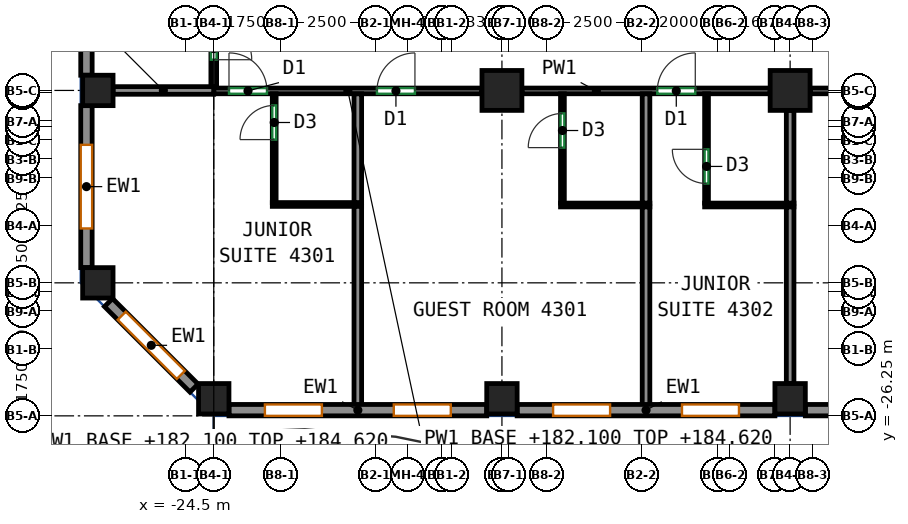
"""IFC4 building model, lengths in metres.
Left out: names, types, materials, properties, quantities, classifications, styles, units other than length and angle.
Written with IfcOpenShell. Run it as: python <this file> out.ifc"""

import sys

from ifc_helpers import new_model, si_unit, direction, frame, frame_2d, origin, origin_2d, place, context, subcontext, project, spatial, rectangle, extrude, source, transform, mapped, element, fill, save


model = new_model("IFC4")
c1 = context("Model", 3, precision=1e-05, world=origin(), true_north=direction((0.0, 1.0)))
c2 = subcontext(c1, "Body", "Model", "MODEL_VIEW")
j1 = project(units=[si_unit("LENGTHUNIT", "METRE"), si_unit("PLANEANGLEUNIT", "RADIAN")], contexts=[c1])
p1 = place(None, origin())
s1 = spatial("IfcSite", under=j1, at=p1, CompositionType="ELEMENT")
p2 = place(p1, origin())
s2 = spatial("IfcBuilding", under=s1, at=p2, CompositionType="ELEMENT")
p3 = place(p2, frame((0.0, 0.0, 182.1)))
s3 = spatial("IfcBuildingStorey", under=s2, at=p3, CompositionType="ELEMENT", Elevation=182.1)
m1 = source(origin(), c2, "Body", "SweptSolid", [
    extrude(rectangle(XDim=0.8, YDim=0.8, at=origin_2d()), origin(), (0.0, 0.0, 1.0), 3.12),
])
for number, where, z_axis, x_axis in (
    (1, (-26.8, -22.75, 0.0), (0.0, 0.0, 1.0), (1.0, 0.0, 0.0)),
    (2, (-26.8, -17.688, 0.0), (0.0, 0.0, 1.0), (1.0, 0.0, 0.0)),
    (3, (-23.75, -25.8, 0.0), (0.0, 0.0, 1.0), (1.0, 0.0, 0.0)),
    (4, (-16.167, -25.8, 0.0), (0.0, 0.0, 1.0), (1.0, 0.0, 0.0)),
):
    element("IfcColumn", number, at=place(p3, frame(where, z_axis=z_axis, x_axis=x_axis)), inside=s3, PredefinedType="COLUMN", context=c2, shape_type="MappedRepresentation", body=[
        mapped(m1, transform((0.0, 0.0, 0.0))),
    ])
m2 = source(origin(), c2, "Body", "SweptSolid", [
    extrude(rectangle(XDim=1.05, YDim=1.05, at=origin_2d()), origin(), (0.0, 0.0, 1.0), 3.12),
])
p4 = place(p3, frame((-16.167, -17.688, 0.0), z_axis=(0.0, 0.0, 1.0), x_axis=(1.0, 0.0, 0.0)))
e5 = element("IfcColumn", 5, at=p4, inside=s3, PredefinedType="COLUMN", context=c2, shape_type="MappedRepresentation", body=[
    mapped(m2, transform((0.0, 0.0, 0.0))),
])
p5 = place(p3, frame((-8.583, -25.8, 0.0), z_axis=(0.0, 0.0, 1.0), x_axis=(1.0, 0.0, 0.0)))
e6 = element("IfcColumn", 6, at=p5, inside=s3, PredefinedType="COLUMN", context=c2, shape_type="MappedRepresentation", body=[
    mapped(m1, transform((0.0, 0.0, 0.0))),
])
p6 = place(p3, frame((-8.583, -17.688, 0.0), z_axis=(0.0, 0.0, 1.0), x_axis=(1.0, 0.0, 0.0)))
e7 = element("IfcColumn", 7, at=p6, inside=s3, PredefinedType="COLUMN", context=c2, shape_type="MappedRepresentation", body=[
    mapped(m2, transform((0.0, 0.0, 0.0))),
])
m3 = source(origin(), c2, "Body", "SweptSolid", [
    extrude(rectangle(XDim=6.783, YDim=0.3, at=frame_2d((3.392, 0.0))), origin(), (0.0, 0.0, 1.0), 3.12),
])
p7 = place(p3, frame((-23.35, -26.1, 0.0), z_axis=(0.0, 0.0, 1.0), x_axis=(1.0, 0.0, 0.0)))
e8 = element("IfcWall", 8, at=p7, inside=s3, PredefinedType="SOLIDWALL", context=c2, shape_type="MappedRepresentation", body=[
    mapped(m3, transform((0.0, 0.0, 0.0))),
])
p8 = place(p7, frame((0.946, 0.0, 0.85)))
e9 = element("IfcOpeningElement", 9, at=p8, cuts=e8, PredefinedType="OPENING", context=c2, shape_type="SweptSolid", body=[
    extrude(rectangle(XDim=1.5, YDim=1.95, at=frame_2d((0.75, 0.975))), frame((0.0, 0.16, 0.0), z_axis=(0.0, -1.0, 0.0), x_axis=(1.0, 0.0, 0.0)), (0.0, 0.0, 1.0), 0.32),
])
p9 = place(p7, frame((4.337, 0.0, 0.85)))
e10 = element("IfcOpeningElement", 10, at=p9, cuts=e8, PredefinedType="OPENING", context=c2, shape_type="SweptSolid", body=[
    extrude(rectangle(XDim=1.5, YDim=1.95, at=frame_2d((0.75, 0.975))), frame((0.0, 0.16, 0.0), z_axis=(0.0, -1.0, 0.0), x_axis=(1.0, 0.0, 0.0)), (0.0, 0.0, 1.0), 0.32),
])
m4 = source(origin(), c2, "Body", "SweptSolid", [
    extrude(rectangle(XDim=6.783, YDim=0.3, at=frame_2d((3.392, 0.0))), origin(), (0.0, 0.0, 1.0), 3.12),
])
p10 = place(p3, frame((-15.767, -26.1, 0.0), z_axis=(0.0, 0.0, 1.0), x_axis=(1.0, 0.0, 0.0)))
e11 = element("IfcWall", 11, at=p10, inside=s3, PredefinedType="SOLIDWALL", context=c2, shape_type="MappedRepresentation", body=[
    mapped(m4, transform((0.0, 0.0, 0.0))),
])
p11 = place(p10, frame((0.946, 0.0, 0.85)))
e12 = element("IfcOpeningElement", 12, at=p11, cuts=e11, PredefinedType="OPENING", context=c2, shape_type="SweptSolid", body=[
    extrude(rectangle(XDim=1.5, YDim=1.95, at=frame_2d((0.75, 0.975))), frame((0.0, 0.16, 0.0), z_axis=(0.0, -1.0, 0.0), x_axis=(1.0, 0.0, 0.0)), (0.0, 0.0, 1.0), 0.32),
])
p12 = place(p10, frame((4.338, 0.0, 0.85)))
e13 = element("IfcOpeningElement", 13, at=p12, cuts=e11, PredefinedType="OPENING", context=c2, shape_type="SweptSolid", body=[
    extrude(rectangle(XDim=1.5, YDim=1.95, at=frame_2d((0.75, 0.975))), frame((0.0, 0.16, 0.0), z_axis=(0.0, -1.0, 0.0), x_axis=(1.0, 0.0, 0.0)), (0.0, 0.0, 1.0), 0.32),
])
p13 = place(p3, frame((-8.183, -26.1, 0.0), z_axis=(0.0, 0.0, 1.0), x_axis=(1.0, 0.0, 0.0)))
e14 = element("IfcWall", 14, at=p13, inside=s3, PredefinedType="SOLIDWALL", context=c2, shape_type="MappedRepresentation", body=[
    mapped(m3, transform((0.0, 0.0, 0.0))),
])
p14 = place(p13, frame((0.946, 0.0, 0.85)))
e15 = element("IfcOpeningElement", 15, at=p14, cuts=e14, PredefinedType="OPENING", context=c2, shape_type="SweptSolid", body=[
    extrude(rectangle(XDim=1.5, YDim=1.95, at=frame_2d((0.75, 0.975))), frame((0.0, 0.16, 0.0), z_axis=(0.0, -1.0, 0.0), x_axis=(1.0, 0.0, 0.0)), (0.0, 0.0, 1.0), 0.32),
])
p15 = place(p13, frame((4.337, 0.0, 0.85)))
e16 = element("IfcOpeningElement", 16, at=p15, cuts=e14, PredefinedType="OPENING", context=c2, shape_type="SweptSolid", body=[
    extrude(rectangle(XDim=1.5, YDim=1.95, at=frame_2d((0.75, 0.975))), frame((0.0, 0.16, 0.0), z_axis=(0.0, -1.0, 0.0), x_axis=(1.0, 0.0, 0.0)), (0.0, 0.0, 1.0), 0.32),
])
m5 = source(origin(), c2, "Body", "SweptSolid", [
    extrude(rectangle(XDim=7.763, YDim=0.3, at=frame_2d((3.881, 0.0))), origin(), (0.0, 0.0, 1.0), 3.12),
])
p16 = place(p3, frame((-27.1, -9.525, 0.0), z_axis=(0.0, 0.0, 1.0), x_axis=(0.0, -1.0, 0.0)))
e17 = element("IfcWall", 17, at=p16, inside=s3, PredefinedType="SOLIDWALL", context=c2, shape_type="MappedRepresentation", body=[
    mapped(m5, transform((0.0, 0.0, 0.0))),
])
p17 = place(p16, frame((0.841, 0.0, 0.85)))
e18 = element("IfcOpeningElement", 18, at=p17, cuts=e17, PredefinedType="OPENING", context=c2, shape_type="SweptSolid", body=[
    extrude(rectangle(XDim=2.2, YDim=1.95, at=frame_2d((1.1, 0.975))), frame((0.0, 0.16, 0.0), z_axis=(0.0, -1.0, 0.0), x_axis=(1.0, 0.0, 0.0)), (0.0, 0.0, 1.0), 0.32),
])
p18 = place(p16, frame((4.722, 0.0, 0.85)))
e19 = element("IfcOpeningElement", 19, at=p18, cuts=e17, PredefinedType="OPENING", context=c2, shape_type="SweptSolid", body=[
    extrude(rectangle(XDim=2.2, YDim=1.95, at=frame_2d((1.1, 0.975))), frame((0.0, 0.16, 0.0), z_axis=(0.0, -1.0, 0.0), x_axis=(1.0, 0.0, 0.0)), (0.0, 0.0, 1.0), 0.32),
])
m6 = source(origin(), c2, "Body", "SweptSolid", [
    extrude(rectangle(XDim=4.263, YDim=0.3, at=frame_2d((2.131, 0.0))), origin(), (0.0, 0.0, 1.0), 3.12),
])
p19 = place(p3, frame((-27.1, -18.087, 0.0), z_axis=(0.0, 0.0, 1.0), x_axis=(0.0, -1.0, 0.0)))
e20 = element("IfcWall", 20, at=p19, inside=s3, PredefinedType="SOLIDWALL", context=c2, shape_type="MappedRepresentation", body=[
    mapped(m6, transform((0.0, 0.0, 0.0))),
])
p20 = place(p19, frame((1.031, 0.0, 0.85)))
e21 = element("IfcOpeningElement", 21, at=p20, cuts=e20, PredefinedType="OPENING", context=c2, shape_type="SweptSolid", body=[
    extrude(rectangle(XDim=2.2, YDim=1.95, at=frame_2d((1.1, 0.975))), frame((0.0, 0.16, 0.0), z_axis=(0.0, -1.0, 0.0), x_axis=(1.0, 0.0, 0.0)), (0.0, 0.0, 1.0), 0.32),
])
m7 = source(origin(), c2, "Body", "SweptSolid", [
    extrude(rectangle(XDim=3.182, YDim=0.3, at=frame_2d((1.591, 0.0))), origin(), (0.0, 0.0, 1.0), 3.12),
])
p21 = place(p3, frame((-26.519, -23.269, 0.0), z_axis=(0.0, 0.0, 1.0), x_axis=(0.707068419229, -0.707145141063, 0.0)))
e22 = element("IfcWall", 22, at=p21, inside=s3, PredefinedType="SOLIDWALL", context=c2, shape_type="MappedRepresentation", body=[
    mapped(m7, transform((0.0, 0.0, 0.0))),
])
p22 = place(p21, frame((0.491, 0.0, 0.85)))
e23 = element("IfcOpeningElement", 23, at=p22, cuts=e22, PredefinedType="OPENING", context=c2, shape_type="SweptSolid", body=[
    extrude(rectangle(XDim=2.2, YDim=1.95, at=frame_2d((1.1, 0.975))), frame((0.0, 0.16, 0.0), z_axis=(0.0, -1.0, 0.0), x_axis=(1.0, 0.0, 0.0)), (0.0, 0.0, 1.0), 0.32),
])
p23 = place(p3, frame((-23.75, -17.7, 0.0), z_axis=(0.0, 0.0, 1.0), x_axis=(1.0, 0.0, 0.0)))
e24 = element("IfcWall", 24, at=p23, inside=s3, PredefinedType="PARTITIONING", context=c2, shape_type="SweptSolid", body=[
    extrude(rectangle(XDim=7.058, YDim=0.15, at=frame_2d((3.529, 0.0))), origin(), (0.0, 0.0, 1.0), 2.52),
])
p24 = place(p23, frame((0.401, 0.0, 0.0)))
e25 = element("IfcOpeningElement", 25, at=p24, cuts=e24, PredefinedType="OPENING", context=c2, shape_type="SweptSolid", body=[
    extrude(rectangle(XDim=1.0, YDim=2.1, at=frame_2d((0.5, 1.05))), frame((0.0, 0.085, 0.0), z_axis=(0.0, -1.0, 0.0), x_axis=(1.0, 0.0, 0.0)), (0.0, 0.0, 1.0), 0.17),
])
p25 = place(p23, frame((4.294, 0.0, 0.0)))
e26 = element("IfcOpeningElement", 26, at=p25, cuts=e24, PredefinedType="OPENING", context=c2, shape_type="SweptSolid", body=[
    extrude(rectangle(XDim=1.0, YDim=2.1, at=frame_2d((0.5, 1.05))), frame((0.0, 0.085, 0.0), z_axis=(0.0, -1.0, 0.0), x_axis=(1.0, 0.0, 0.0)), (0.0, 0.0, 1.0), 0.17),
])
p26 = place(p3, frame((-15.642, -17.7, 0.0), z_axis=(0.0, 0.0, 1.0), x_axis=(1.0, 0.0, 0.0)))
e27 = element("IfcWall", 27, at=p26, inside=s3, PredefinedType="PARTITIONING", context=c2, shape_type="SweptSolid", body=[
    extrude(rectangle(XDim=6.534, YDim=0.15, at=frame_2d((3.267, 0.0))), origin(), (0.0, 0.0, 1.0), 3.12),
])
p27 = place(p26, frame((3.563, 0.0, 0.0)))
e28 = element("IfcOpeningElement", 28, at=p27, cuts=e27, PredefinedType="OPENING", context=c2, shape_type="SweptSolid", body=[
    extrude(rectangle(XDim=1.0, YDim=2.1, at=frame_2d((0.5, 1.05))), frame((0.0, 0.085, 0.0), z_axis=(0.0, -1.0, 0.0), x_axis=(1.0, 0.0, 0.0)), (0.0, 0.0, 1.0), 0.17),
])
p28 = place(p3, frame((-8.058, -17.7, 0.0), z_axis=(0.0, 0.0, 1.0), x_axis=(1.0, 0.0, 0.0)))
e29 = element("IfcWall", 29, at=p28, inside=s3, PredefinedType="PARTITIONING", context=c2, shape_type="SweptSolid", body=[
    extrude(rectangle(XDim=6.533, YDim=0.15, at=frame_2d((3.267, 0.0))), origin(), (0.0, 0.0, 1.0), 3.12),
])
p29 = place(p28, frame((3.26, 0.0, 0.0)))
e30 = element("IfcOpeningElement", 30, at=p29, cuts=e29, PredefinedType="OPENING", context=c2, shape_type="SweptSolid", body=[
    extrude(rectangle(XDim=1.0, YDim=2.1, at=frame_2d((0.5, 1.05))), frame((0.0, 0.085, 0.0), z_axis=(0.0, -1.0, 0.0), x_axis=(1.0, 0.0, 0.0)), (0.0, 0.0, 1.0), 0.17),
])
p30 = place(p3, frame((-23.75, -15.575, 0.0), z_axis=(0.0, 0.0, 1.0), x_axis=(0.0, -1.0, 0.0)))
e31 = element("IfcWall", 31, at=p30, inside=s3, PredefinedType="PARTITIONING", context=c2, shape_type="SweptSolid", body=[
    extrude(rectangle(XDim=2.023, YDim=0.15, at=frame_2d((1.011, 0.0))), origin(), (0.0, 0.0, 1.0), 2.52),
])
p31 = place(p30, frame((0.304, 0.0, 0.0)))
e32 = element("IfcOpeningElement", 32, at=p31, cuts=e31, PredefinedType="OPENING", context=c2, shape_type="SweptSolid", body=[
    extrude(rectangle(XDim=1.0, YDim=2.1, at=frame_2d((0.5, 1.05))), frame((0.0, 0.085, 0.0), z_axis=(0.0, -1.0, 0.0), x_axis=(1.0, 0.0, 0.0)), (0.0, 0.0, 1.0), 0.17),
])
p32 = place(p3, frame((-22.159, -20.638, 0.0), z_axis=(0.0, 0.0, 1.0), x_axis=(0.0, 1.0, 0.0)))
e33 = element("IfcWall", 33, at=p32, inside=s3, PredefinedType="PARTITIONING", context=c2, shape_type="SweptSolid", body=[
    extrude(rectangle(XDim=2.861, YDim=0.1, at=frame_2d((1.43, 0.0))), origin(), (0.0, 0.0, 1.0), 3.12),
])
p33 = place(p32, frame((1.657, 0.0, 0.0)))
e34 = element("IfcOpeningElement", 34, at=p33, cuts=e33, PredefinedType="OPENING", context=c2, shape_type="SweptSolid", body=[
    extrude(rectangle(XDim=0.9, YDim=2.1, at=frame_2d((0.45, 1.05))), frame((0.0, 0.06, 0.0), z_axis=(0.0, -1.0, 0.0), x_axis=(1.0, 0.0, 0.0)), (0.0, 0.0, 1.0), 0.12),
])
p34 = place(p3, frame((-22.209, -20.688, 0.0), z_axis=(0.0, 0.0, 1.0), x_axis=(1.0, 0.0, 0.0)))
e35 = element("IfcWall", 35, at=p34, inside=s3, PredefinedType="PARTITIONING", context=c2, shape_type="SweptSolid", body=[
    extrude(rectangle(XDim=2.35, YDim=0.1, at=frame_2d((1.175, 0.0))), origin(), (0.0, 0.0, 1.0), 3.12),
])
p35 = place(p3, frame((-19.959, -26.0, 0.0), z_axis=(0.0, 0.0, 1.0), x_axis=(0.0, 1.0, 0.0)))
e36 = element("IfcWall", 36, at=p35, inside=s3, PredefinedType="PARTITIONING", context=c2, shape_type="SweptSolid", body=[
    extrude(rectangle(XDim=5.262, YDim=0.2, at=frame_2d((2.631, 0.0))), origin(), (0.0, 0.0, 1.0), 3.12),
])
p36 = place(p3, frame((-26.4, -17.688, 0.0), z_axis=(0.0, 0.0, 1.0), x_axis=(1.0, 0.0, 0.0)))
e37 = element("IfcWall", 37, at=p36, inside=s3, PredefinedType="PARTITIONING", context=c2, shape_type="SweptSolid", body=[
    extrude(rectangle(XDim=2.648, YDim=0.2, at=frame_2d((1.324, 0.0))), origin(), (0.0, 0.0, 1.0), 2.52),
])
p37 = place(p3, frame((-19.959, -20.638, 0.0), z_axis=(0.0, 0.0, 1.0), x_axis=(0.0, 1.0, 0.0)))
e38 = element("IfcWall", 38, at=p37, inside=s3, PredefinedType="PARTITIONING", context=c2, shape_type="SweptSolid", body=[
    extrude(rectangle(XDim=2.861, YDim=0.2, at=frame_2d((1.43, 0.0))), origin(), (0.0, 0.0, 1.0), 3.12),
])
p38 = place(p3, frame((-14.575, -20.652, 0.0), z_axis=(0.0, 0.0, 1.0), x_axis=(0.0, 1.0, 0.0)))
e39 = element("IfcWall", 39, at=p38, inside=s3, PredefinedType="PARTITIONING", context=c2, shape_type="SweptSolid", body=[
    extrude(rectangle(XDim=2.875, YDim=0.1, at=frame_2d((1.438, 0.0))), origin(), (0.0, 0.0, 1.0), 3.12),
])
p39 = place(p38, frame((1.46, 0.0, 0.0)))
e40 = element("IfcOpeningElement", 40, at=p39, cuts=e39, PredefinedType="OPENING", context=c2, shape_type="SweptSolid", body=[
    extrude(rectangle(XDim=0.9, YDim=2.1, at=frame_2d((0.45, 1.05))), frame((0.0, 0.06, 0.0), z_axis=(0.0, -1.0, 0.0), x_axis=(1.0, 0.0, 0.0)), (0.0, 0.0, 1.0), 0.12),
])
p40 = place(p3, frame((-14.625, -20.702, 0.0), z_axis=(0.0, 0.0, 1.0), x_axis=(1.0, 0.0, 0.0)))
e41 = element("IfcWall", 41, at=p40, inside=s3, PredefinedType="PARTITIONING", context=c2, shape_type="SweptSolid", body=[
    extrude(rectangle(XDim=2.35, YDim=0.1, at=frame_2d((1.175, 0.0))), origin(), (0.0, 0.0, 1.0), 3.12),
])
p41 = place(p3, frame((-12.375, -26.0, 0.0), z_axis=(0.0, 0.0, 1.0), x_axis=(0.0, 1.0, 0.0)))
e42 = element("IfcWall", 42, at=p41, inside=s3, PredefinedType="PARTITIONING", context=c2, shape_type="SweptSolid", body=[
    extrude(rectangle(XDim=5.248, YDim=0.2, at=frame_2d((2.624, 0.0))), origin(), (0.0, 0.0, 1.0), 3.12),
])
p42 = place(p3, frame((-12.375, -20.652, 0.0), z_axis=(0.0, 0.0, 1.0), x_axis=(0.0, 1.0, 0.0)))
e43 = element("IfcWall", 43, at=p42, inside=s3, PredefinedType="PARTITIONING", context=c2, shape_type="SweptSolid", body=[
    extrude(rectangle(XDim=2.875, YDim=0.2, at=frame_2d((1.438, 0.0))), origin(), (0.0, 0.0, 1.0), 3.12),
])
p43 = place(p3, frame((-10.783, -20.652, 0.0), z_axis=(0.0, 0.0, 1.0), x_axis=(0.0, 1.0, 0.0)))
e44 = element("IfcWall", 44, at=p43, inside=s3, PredefinedType="PARTITIONING", context=c2, shape_type="SweptSolid", body=[
    extrude(rectangle(XDim=2.875, YDim=0.1, at=frame_2d((1.438, 0.0))), origin(), (0.0, 0.0, 1.0), 3.12),
])
p44 = place(p43, frame((0.515, 0.0, 0.0)))
e45 = element("IfcOpeningElement", 45, at=p44, cuts=e44, PredefinedType="OPENING", context=c2, shape_type="SweptSolid", body=[
    extrude(rectangle(XDim=0.9, YDim=2.1, at=frame_2d((0.45, 1.05))), frame((0.0, 0.06, 0.0), z_axis=(0.0, -1.0, 0.0), x_axis=(1.0, 0.0, 0.0)), (0.0, 0.0, 1.0), 0.12),
])
p45 = place(p3, frame((-10.833, -20.702, 0.0), z_axis=(0.0, 0.0, 1.0), x_axis=(1.0, 0.0, 0.0)))
e46 = element("IfcWall", 46, at=p45, inside=s3, PredefinedType="PARTITIONING", context=c2, shape_type="SweptSolid", body=[
    extrude(rectangle(XDim=2.35, YDim=0.1, at=frame_2d((1.175, 0.0))), origin(), (0.0, 0.0, 1.0), 3.12),
])
p46 = place(p3, frame((-8.583, -25.4, 0.0), z_axis=(0.0, 0.0, 1.0), x_axis=(0.0, 1.0, 0.0)))
e47 = element("IfcWall", 47, at=p46, inside=s3, PredefinedType="PARTITIONING", context=c2, shape_type="SweptSolid", body=[
    extrude(rectangle(XDim=4.648, YDim=0.2, at=frame_2d((2.324, 0.0))), origin(), (0.0, 0.0, 1.0), 3.12),
])
p47 = place(p3, frame((-8.583, -20.652, 0.0), z_axis=(0.0, 0.0, 1.0), x_axis=(0.0, 1.0, 0.0)))
e48 = element("IfcWall", 48, at=p47, inside=s3, PredefinedType="PARTITIONING", context=c2, shape_type="SweptSolid", body=[
    extrude(rectangle(XDim=2.44, YDim=0.2, at=frame_2d((1.22, 0.0))), origin(), (0.0, 0.0, 1.0), 3.12),
])
p48 = place(p8, origin())
e49 = element("IfcWindow", 49, at=p48, inside=s3, PartitioningType="SINGLE_PANEL", PredefinedType="WINDOW", context=c2, shape_type="SweptSolid", body=[
    extrude(rectangle(XDim=1.5, YDim=1.95, at=frame_2d((0.75, 0.975))), frame((0.0, 0.03, 0.0), z_axis=(0.0, -1.0, 0.0), x_axis=(1.0, 0.0, 0.0)), (0.0, 0.0, 1.0), 0.06),
])
fill(e9, e49)
p49 = place(p9, origin())
e50 = element("IfcWindow", 50, at=p49, inside=s3, PartitioningType="SINGLE_PANEL", PredefinedType="WINDOW", context=c2, shape_type="SweptSolid", body=[
    extrude(rectangle(XDim=1.5, YDim=1.95, at=frame_2d((0.75, 0.975))), frame((0.0, 0.03, 0.0), z_axis=(0.0, -1.0, 0.0), x_axis=(1.0, 0.0, 0.0)), (0.0, 0.0, 1.0), 0.06),
])
fill(e10, e50)
p50 = place(p11, origin())
e51 = element("IfcWindow", 51, at=p50, inside=s3, PartitioningType="SINGLE_PANEL", PredefinedType="WINDOW", context=c2, shape_type="SweptSolid", body=[
    extrude(rectangle(XDim=1.5, YDim=1.95, at=frame_2d((0.75, 0.975))), frame((0.0, 0.03, 0.0), z_axis=(0.0, -1.0, 0.0), x_axis=(1.0, 0.0, 0.0)), (0.0, 0.0, 1.0), 0.06),
])
fill(e12, e51)
p51 = place(p12, origin())
e52 = element("IfcWindow", 52, at=p51, inside=s3, PartitioningType="SINGLE_PANEL", PredefinedType="WINDOW", context=c2, shape_type="SweptSolid", body=[
    extrude(rectangle(XDim=1.5, YDim=1.95, at=frame_2d((0.75, 0.975))), frame((0.0, 0.03, 0.0), z_axis=(0.0, -1.0, 0.0), x_axis=(1.0, 0.0, 0.0)), (0.0, 0.0, 1.0), 0.06),
])
fill(e13, e52)
p52 = place(p20, origin())
e53 = element("IfcWindow", 53, at=p52, inside=s3, PartitioningType="SINGLE_PANEL", PredefinedType="WINDOW", context=c2, shape_type="SweptSolid", body=[
    extrude(rectangle(XDim=2.2, YDim=1.95, at=frame_2d((1.1, 0.975))), frame((0.0, 0.03, 0.0), z_axis=(0.0, -1.0, 0.0), x_axis=(1.0, 0.0, 0.0)), (0.0, 0.0, 1.0), 0.06),
])
fill(e21, e53)
p53 = place(p22, origin())
e54 = element("IfcWindow", 54, at=p53, inside=s3, PartitioningType="SINGLE_PANEL", PredefinedType="WINDOW", context=c2, shape_type="SweptSolid", body=[
    extrude(rectangle(XDim=2.2, YDim=1.95, at=frame_2d((1.1, 0.975))), frame((0.0, 0.03, 0.0), z_axis=(0.0, -1.0, 0.0), x_axis=(1.0, 0.0, 0.0)), (0.0, 0.0, 1.0), 0.06),
])
fill(e23, e54)
p54 = place(p44, origin())
e55 = element("IfcDoor", 55, at=p54, inside=s3, OperationType="SINGLE_SWING_RIGHT", PredefinedType="DOOR", context=c2, shape_type="SweptSolid", body=[
    extrude(rectangle(XDim=0.9, YDim=2.1, at=frame_2d((0.45, 1.05))), frame((0.0, 0.025, 0.0), z_axis=(0.0, -1.0, 0.0), x_axis=(1.0, 0.0, 0.0)), (0.0, 0.0, 1.0), 0.05),
])
fill(e45, e55)
p55 = place(p39, origin())
e56 = element("IfcDoor", 56, at=p55, inside=s3, OperationType="SINGLE_SWING_LEFT", PredefinedType="DOOR", context=c2, shape_type="SweptSolid", body=[
    extrude(rectangle(XDim=0.9, YDim=2.1, at=frame_2d((0.45, 1.05))), frame((0.0, 0.025, 0.0), z_axis=(0.0, -1.0, 0.0), x_axis=(1.0, 0.0, 0.0)), (0.0, 0.0, 1.0), 0.05),
])
fill(e40, e56)
p56 = place(p33, origin())
e57 = element("IfcDoor", 57, at=p56, inside=s3, OperationType="SINGLE_SWING_LEFT", PredefinedType="DOOR", context=c2, shape_type="SweptSolid", body=[
    extrude(rectangle(XDim=0.9, YDim=2.1, at=frame_2d((0.45, 1.05))), frame((0.0, 0.025, 0.0), z_axis=(0.0, -1.0, 0.0), x_axis=(1.0, 0.0, 0.0)), (0.0, 0.0, 1.0), 0.05),
])
fill(e34, e57)
p57 = place(p24, origin())
e58 = element("IfcDoor", 58, at=p57, inside=s3, OperationType="SINGLE_SWING_LEFT", PredefinedType="DOOR", context=c2, shape_type="SweptSolid", body=[
    extrude(rectangle(XDim=1.0, YDim=2.1, at=frame_2d((0.5, 1.05))), frame((0.0, 0.025, 0.0), z_axis=(0.0, -1.0, 0.0), x_axis=(1.0, 0.0, 0.0)), (0.0, 0.0, 1.0), 0.05),
])
fill(e25, e58)
p58 = place(p25, origin())
e59 = element("IfcDoor", 59, at=p58, inside=s3, OperationType="SINGLE_SWING_RIGHT", PredefinedType="DOOR", context=c2, shape_type="SweptSolid", body=[
    extrude(rectangle(XDim=1.0, YDim=2.1, at=frame_2d((0.5, 1.05))), frame((0.0, 0.025, 0.0), z_axis=(0.0, -1.0, 0.0), x_axis=(1.0, 0.0, 0.0)), (0.0, 0.0, 1.0), 0.05),
])
fill(e26, e59)
p59 = place(p27, origin())
e60 = element("IfcDoor", 60, at=p59, inside=s3, OperationType="SINGLE_SWING_RIGHT", PredefinedType="DOOR", context=c2, shape_type="SweptSolid", body=[
    extrude(rectangle(XDim=1.0, YDim=2.1, at=frame_2d((0.5, 1.05))), frame((0.0, 0.025, 0.0), z_axis=(0.0, -1.0, 0.0), x_axis=(1.0, 0.0, 0.0)), (0.0, 0.0, 1.0), 0.05),
])
fill(e28, e60)
p60 = place(p31, origin())
e61 = element("IfcDoor", 61, at=p60, inside=s3, OperationType="SINGLE_SWING_RIGHT", PredefinedType="DOOR", context=c2, shape_type="SweptSolid", body=[
    extrude(rectangle(XDim=1.0, YDim=2.1, at=frame_2d((0.5, 1.05))), frame((0.0, 0.025, 0.0), z_axis=(0.0, -1.0, 0.0), x_axis=(1.0, 0.0, 0.0)), (0.0, 0.0, 1.0), 0.05),
])
fill(e32, e61)
save(model, sys.argv[1])
